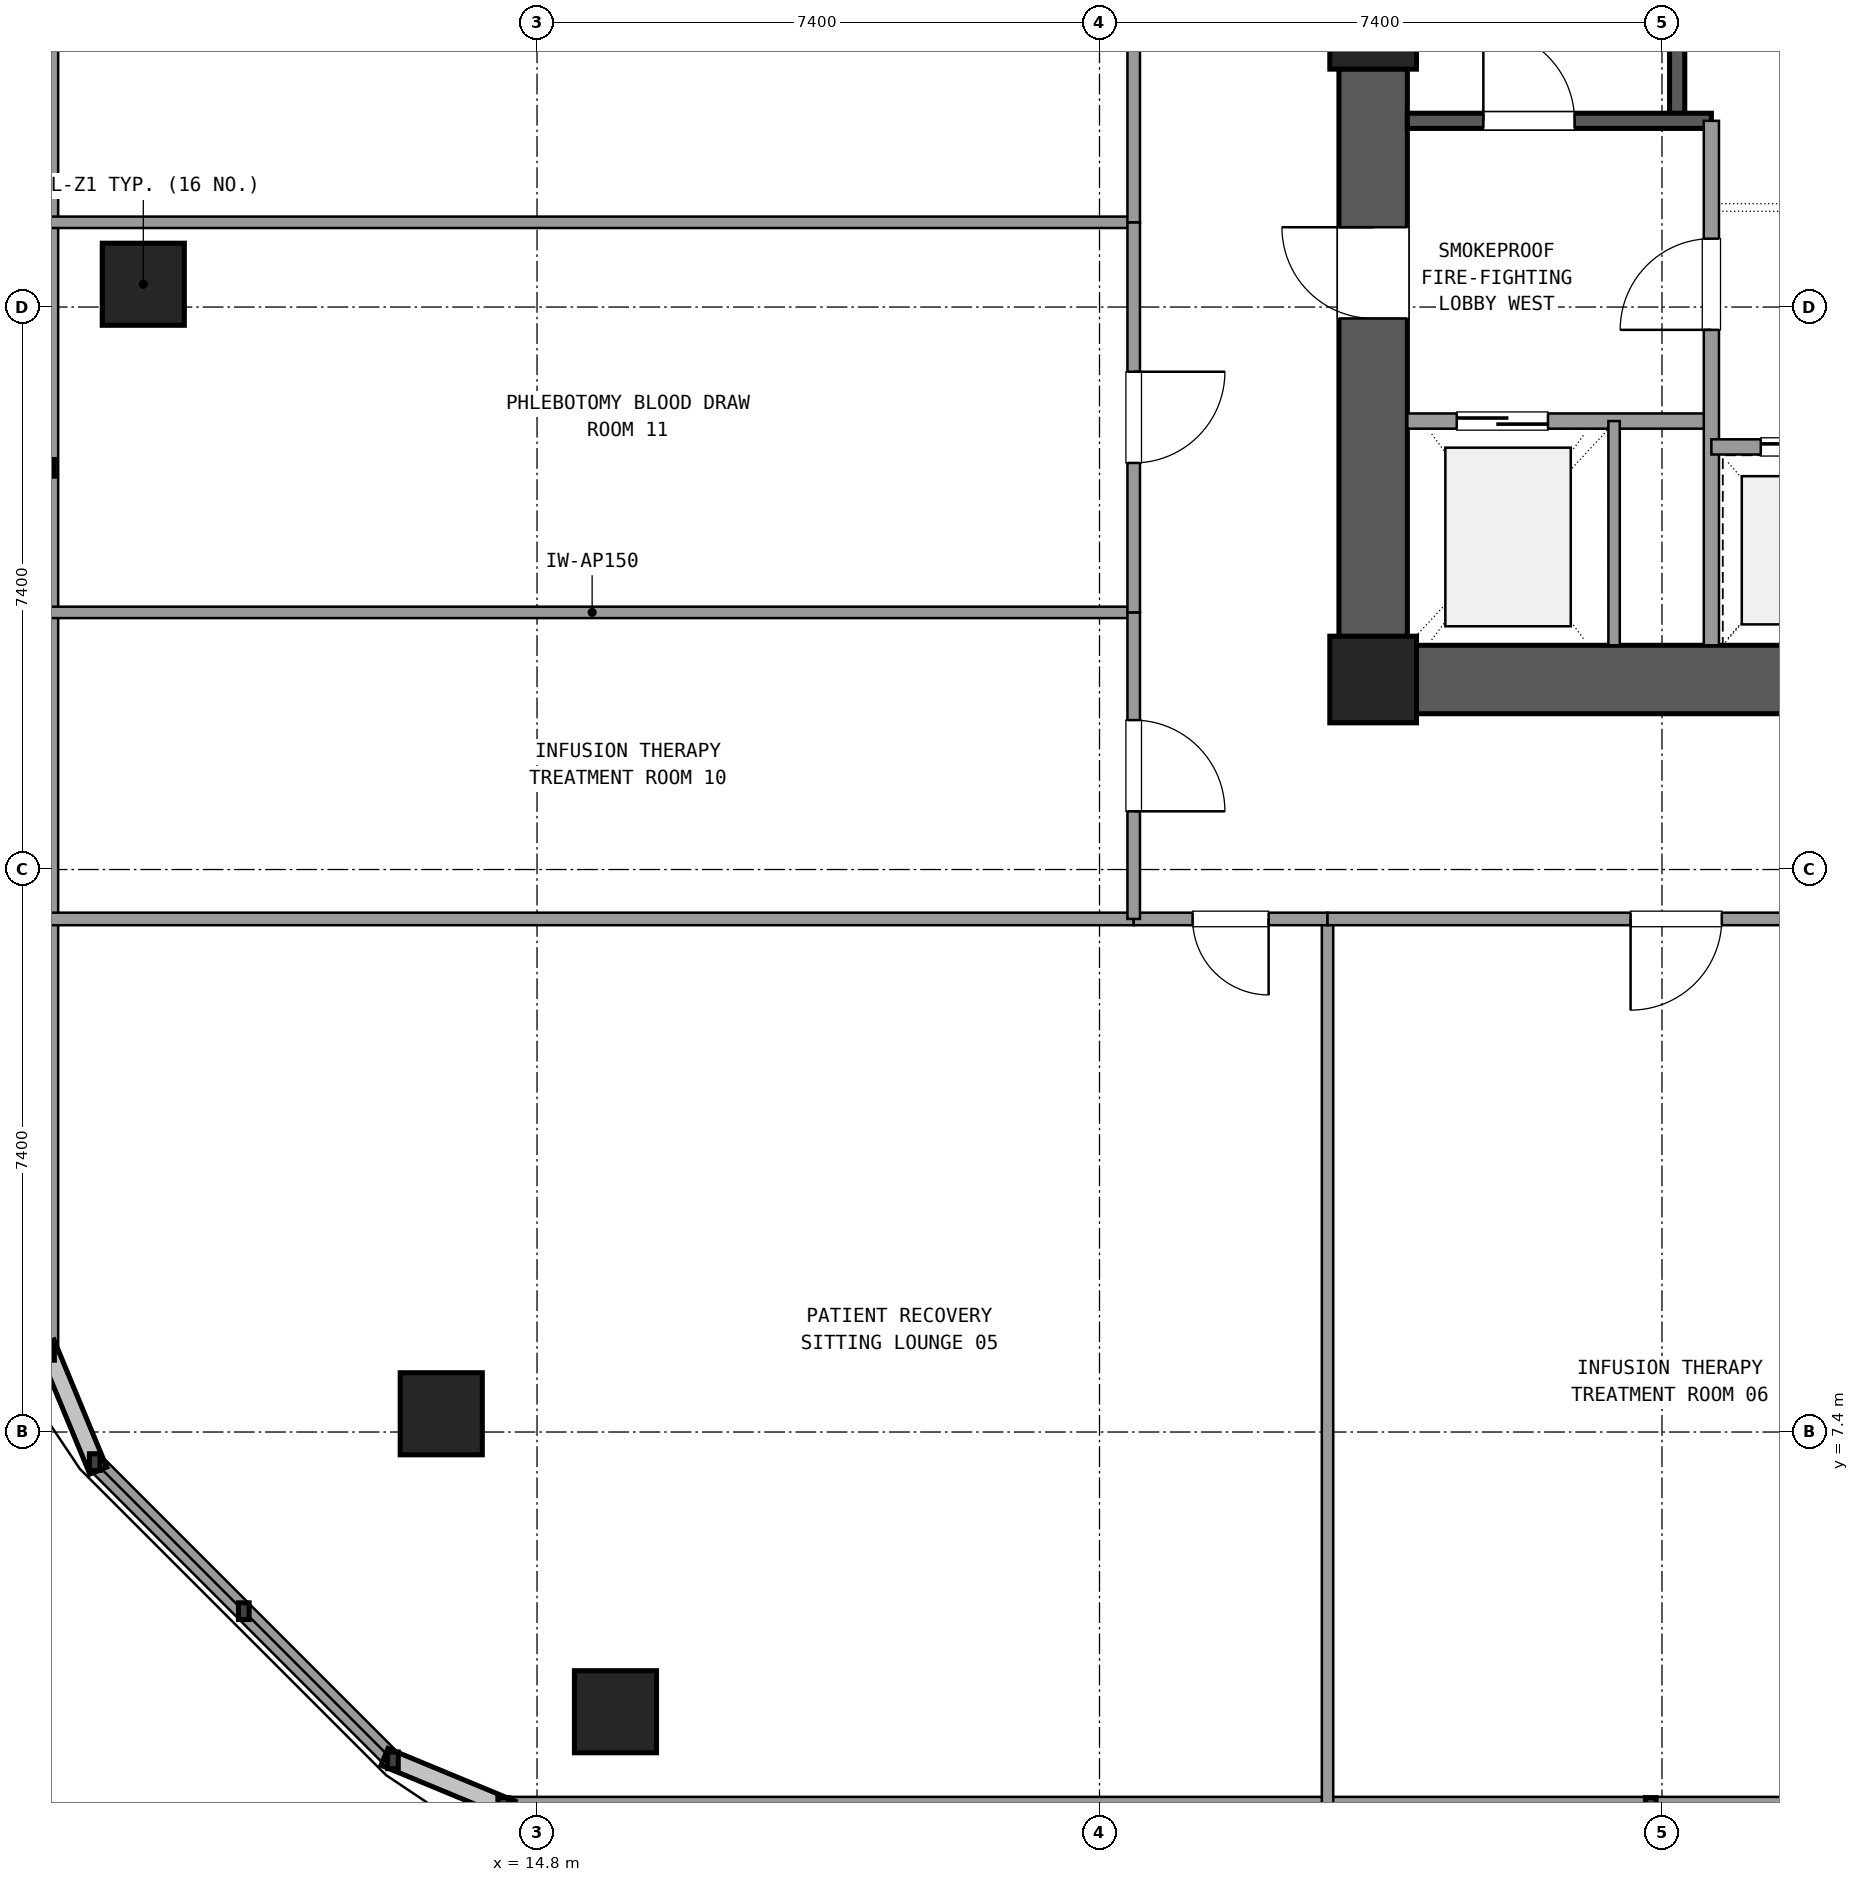
"""IFC4 building model, lengths in metres.
Left out: names, types, materials, properties, quantities, classifications, styles, units other than length and angle.
Written with IfcOpenShell. Run it as: python <this file> out.ifc"""

import sys

from ifc_helpers import new_model, si_unit, direction, frame, frame_2d, origin, origin_2d, place, context, subcontext, project, spatial, rectangle, extrude, element, fill, save


model = new_model("IFC4")
c1 = context("Model", 3, precision=1e-05, world=origin(), true_north=direction((0.0, 1.0)))
c2 = subcontext(c1, "Body", "Model", "MODEL_VIEW")
j1 = project(units=[si_unit("LENGTHUNIT", "METRE"), si_unit("PLANEANGLEUNIT", "RADIAN")], contexts=[c1])
p1 = place(None, origin())
s1 = spatial("IfcSite", under=j1, at=p1, CompositionType="ELEMENT")
p2 = place(p1, origin())
s2 = spatial("IfcBuilding", under=s1, at=p2, CompositionType="ELEMENT")
p3 = place(p2, frame((0.0, 0.0, 59.94)))
s3 = spatial("IfcBuildingStorey", under=s2, at=p3, CompositionType="ELEMENT", Elevation=59.94)
for number, where, z_axis, x_axis in (
    (1, (25.8, 17.3, 0.0), (0.0, 0.0, 1.0), (1.0, 0.0, 0.0)),
    (2, (25.8, 25.9, 0.0), (0.0, 0.0, 1.0), (1.0, 0.0, 0.0)),
):
    element("IfcColumn", number, at=place(p3, frame(where, z_axis=z_axis, x_axis=x_axis)), inside=s3, PredefinedType="COLUMN", context=c2, shape_type="SweptSolid", body=[
        extrude(rectangle(XDim=1.14, YDim=1.14, at=origin_2d()), origin(), (0.0, 0.0, 1.0), 3.6),
    ])
p4 = place(p3, frame((26.365, 17.3, 0.0), z_axis=(0.0, 0.0, 1.0), x_axis=(1.0, 0.0, 0.0)))
e3 = element("IfcWall", 3, at=p4, inside=s3, PredefinedType="SHEAR", context=c2, shape_type="SweptSolid", body=[
    extrude(rectangle(XDim=10.07, YDim=0.9, at=frame_2d((5.035, 0.0))), origin(), (0.0, 0.0, 1.0), 3.32),
])
p5 = place(p3, frame((25.8, 25.335, 0.0), z_axis=(0.0, 0.0, 1.0), x_axis=(0.0, -1.0, 0.0)))
e4 = element("IfcWall", 4, at=p5, inside=s3, PredefinedType="SHEAR", context=c2, shape_type="SweptSolid", body=[
    extrude(rectangle(XDim=7.47, YDim=0.9, at=frame_2d((3.735, 0.0))), origin(), (0.0, 0.0, 1.0), 3.32),
])
p6 = place(p5, frame((2.085, 0.0, 0.0)))
e5 = element("IfcOpeningElement", 5, at=p6, cuts=e4, PredefinedType="OPENING", context=c2, shape_type="SweptSolid", body=[
    extrude(rectangle(XDim=1.2, YDim=2.15, at=frame_2d((0.6, 1.075))), frame((0.0, 0.46, 0.0), z_axis=(0.0, -1.0, 0.0), x_axis=(1.0, 0.0, 0.0)), (0.0, 0.0, 1.0), 0.92),
])
for number, where, z_axis, x_axis in (
    (6, (9.62, 22.5, 0.0), (0.0, 0.0, 1.0), (1.0, 0.0, 0.0)),
    (7, (13.54, 7.64, 0.0), (0.0, 0.0, 1.0), (1.0, 0.0, 0.0)),
    (8, (15.832, 3.72, 0.0), (0.0, 0.0, 1.0), (1.0, 0.0, 0.0)),
):
    element("IfcColumn", number, at=place(p3, frame(where, z_axis=z_axis, x_axis=x_axis)), inside=s3, PredefinedType="COLUMN", context=c2, shape_type="SweptSolid", body=[
        extrude(rectangle(XDim=1.08, YDim=1.08, at=origin_2d()), origin(), (0.0, 0.0, 1.0), 3.6),
    ])
p7 = place(p3, frame((14.355, 2.48, 0.0), z_axis=(0.0, 0.0, 1.0), x_axis=(1.0, 0.0, 0.0)))
e9 = element("IfcWall", 9, at=p7, inside=s3, PredefinedType="SOLIDWALL", context=c2, shape_type="SweptSolid", body=[
    extrude(rectangle(XDim=45.29, YDim=0.24, at=frame_2d((22.645, 0.0))), origin(), (0.0, 0.0, 1.0), 0.85),
])
p8 = place(p3, frame((8.38, 43.345, 0.0), z_axis=(0.0, 0.0, 1.0), x_axis=(0.0, -1.0, 0.0)))
e10 = element("IfcWall", 10, at=p8, inside=s3, PredefinedType="SOLIDWALL", context=c2, shape_type="SweptSolid", body=[
    extrude(rectangle(XDim=34.89, YDim=0.24, at=frame_2d((17.445, 0.0))), origin(), (0.0, 0.0, 1.0), 0.85),
])
p9 = place(p3, frame((8.981, 7.004, 0.0), z_axis=(0.0, 0.0, 1.0), x_axis=(0.707128783731, -0.707084777957, 0.0)))
e11 = element("IfcWall", 11, at=p9, inside=s3, PredefinedType="SOLIDWALL", context=c2, shape_type="SweptSolid", body=[
    extrude(rectangle(XDim=5.548, YDim=0.24, at=frame_2d((2.774, 0.0))), origin(), (0.0, 0.0, 1.0), 0.85),
])
p10 = place(p3, frame((29.8, 24.65, 0.0), z_axis=(0.0, 0.0, 1.0), x_axis=(0.0, 1.0, 0.0)))
e12 = element("IfcWall", 12, at=p10, inside=s3, PredefinedType="SHEAR", context=c2, shape_type="SweptSolid", body=[
    extrude(rectangle(XDim=9.4, YDim=0.2, at=frame_2d((4.7, 0.0))), origin(), (0.0, 0.0, 1.0), 3.32),
])
p11 = place(p3, frame((26.25, 24.65, 0.0), z_axis=(0.0, 0.0, 1.0), x_axis=(1.0, 0.0, 0.0)))
e13 = element("IfcWall", 13, at=p11, inside=s3, PredefinedType="SHEAR", context=c2, shape_type="SweptSolid", body=[
    extrude(rectangle(XDim=4.0, YDim=0.2, at=frame_2d((2.0, 0.0))), origin(), (0.0, 0.0, 1.0), 3.32),
])
p12 = place(p11, frame((1.0, 0.0, 0.0)))
e14 = element("IfcOpeningElement", 14, at=p12, cuts=e13, PredefinedType="OPENING", context=c2, shape_type="SweptSolid", body=[
    extrude(rectangle(XDim=1.2, YDim=2.15, at=frame_2d((0.6, 1.075))), frame((0.0, 0.11, 0.0), z_axis=(0.0, -1.0, 0.0), x_axis=(1.0, 0.0, 0.0)), (0.0, 0.0, 1.0), 0.22),
])
p13 = place(p3, frame((26.25, 20.7, 0.0), z_axis=(0.0, 0.0, 1.0), x_axis=(1.0, 0.0, 0.0)))
e15 = element("IfcWall", 15, at=p13, inside=s3, PredefinedType="SOLIDWALL", context=c2, shape_type="SweptSolid", body=[
    extrude(rectangle(XDim=4.0, YDim=0.2, at=frame_2d((2.0, 0.0))), origin(), (0.0, 0.0, 1.0), 2.61),
])
p14 = place(p13, frame((0.65, 0.0, 0.0)))
e16 = element("IfcOpeningElement", 16, at=p14, cuts=e15, PredefinedType="OPENING", context=c2, shape_type="SweptSolid", body=[
    extrude(rectangle(XDim=1.2, YDim=2.15, at=frame_2d((0.6, 1.075))), frame((0.0, 0.11, 0.0), z_axis=(0.0, -1.0, 0.0), x_axis=(1.0, 0.0, 0.0)), (0.0, 0.0, 1.0), 0.22),
])
p15 = place(p3, frame((30.25, 17.75, 0.0), z_axis=(0.0, 0.0, 1.0), x_axis=(0.0, 1.0, 0.0)))
e17 = element("IfcWall", 17, at=p15, inside=s3, PredefinedType="SOLIDWALL", context=c2, shape_type="SweptSolid", body=[
    extrude(rectangle(XDim=6.9, YDim=0.2, at=frame_2d((3.45, 0.0))), origin(), (0.0, 0.0, 1.0), 2.61),
])
p16 = place(p15, frame((4.15, 0.0, 0.0)))
e18 = element("IfcOpeningElement", 18, at=p16, cuts=e17, PredefinedType="OPENING", context=c2, shape_type="SweptSolid", body=[
    extrude(rectangle(XDim=1.2, YDim=2.15, at=frame_2d((0.6, 1.075))), frame((0.0, 0.11, 0.0), z_axis=(0.0, -1.0, 0.0), x_axis=(1.0, 0.0, 0.0)), (0.0, 0.0, 1.0), 0.22),
])
p17 = place(p3, frame((28.97, 17.75, 0.0), z_axis=(0.0, 0.0, 1.0), x_axis=(0.0, 1.0, 0.0)))
e19 = element("IfcWall", 19, at=p17, inside=s3, PredefinedType="PARTITIONING", context=c2, shape_type="SweptSolid", body=[
    extrude(rectangle(XDim=2.95, YDim=0.15, at=frame_2d((1.475, 0.0))), origin(), (0.0, 0.0, 1.0), 2.61),
])
p18 = place(p3, frame((30.25, 20.36, 0.0), z_axis=(0.0, 0.0, 1.0), x_axis=(1.0, 0.0, 0.0)))
e20 = element("IfcWall", 20, at=p18, inside=s3, PredefinedType="SOLIDWALL", context=c2, shape_type="SweptSolid", body=[
    extrude(rectangle(XDim=7.0, YDim=0.2, at=frame_2d((3.5, 0.0))), origin(), (0.0, 0.0, 1.0), 2.61),
])
p19 = place(p18, frame((0.65, 0.0, 0.0)))
e21 = element("IfcOpeningElement", 21, at=p19, cuts=e20, PredefinedType="OPENING", context=c2, shape_type="SweptSolid", body=[
    extrude(rectangle(XDim=1.1, YDim=2.15, at=frame_2d((0.55, 1.075))), frame((0.0, 0.11, 0.0), z_axis=(0.0, -1.0, 0.0), x_axis=(1.0, 0.0, 0.0)), (0.0, 0.0, 1.0), 0.22),
])
p20 = place(p18, frame((2.95, 0.0, 0.0)))
e22 = element("IfcOpeningElement", 22, at=p20, cuts=e20, PredefinedType="OPENING", context=c2, shape_type="SweptSolid", body=[
    extrude(rectangle(XDim=1.1, YDim=2.15, at=frame_2d((0.55, 1.075))), frame((0.0, 0.11, 0.0), z_axis=(0.0, -1.0, 0.0), x_axis=(1.0, 0.0, 0.0)), (0.0, 0.0, 1.0), 0.22),
])
p21 = place(p18, frame((5.25, 0.0, 0.0)))
e23 = element("IfcOpeningElement", 23, at=p21, cuts=e20, PredefinedType="OPENING", context=c2, shape_type="SweptSolid", body=[
    extrude(rectangle(XDim=1.1, YDim=2.15, at=frame_2d((0.55, 1.075))), frame((0.0, 0.11, 0.0), z_axis=(0.0, -1.0, 0.0), x_axis=(1.0, 0.0, 0.0)), (0.0, 0.0, 1.0), 0.22),
])
p22 = place(p3, frame((8.4, 14.15, 0.0), z_axis=(0.0, 0.0, 1.0), x_axis=(1.0, 0.0, 0.0)))
e24 = element("IfcWall", 24, at=p22, inside=s3, PredefinedType="PARTITIONING", context=c2, shape_type="SweptSolid", body=[
    extrude(rectangle(XDim=14.25, YDim=0.165, at=frame_2d((7.125, 0.0))), origin(), (0.0, 0.0, 1.0), 2.61),
])
p23 = place(p3, frame((25.2, 14.15, 0.0), z_axis=(0.0, 0.0, 1.0), x_axis=(0.0, -1.0, 0.0)))
e25 = element("IfcWall", 25, at=p23, inside=s3, PredefinedType="PARTITIONING", context=c2, shape_type="SweptSolid", body=[
    extrude(rectangle(XDim=11.65, YDim=0.15, at=frame_2d((5.825, 0.0))), origin(), (0.0, 0.0, 1.0), 2.61),
])
p24 = place(p3, frame((22.65, 14.15, 0.0), z_axis=(0.0, 0.0, 1.0), x_axis=(1.0, 0.0, 0.0)))
e26 = element("IfcWall", 26, at=p24, inside=s3, PredefinedType="PARTITIONING", context=c2, shape_type="SweptSolid", body=[
    extrude(rectangle(XDim=2.55, YDim=0.165, at=frame_2d((1.275, 0.0))), origin(), (0.0, 0.0, 1.0), 2.61),
])
p25 = place(p24, frame((0.775, 0.0, 0.0)))
e27 = element("IfcOpeningElement", 27, at=p25, cuts=e26, PredefinedType="OPENING", context=c2, shape_type="SweptSolid", body=[
    extrude(rectangle(XDim=1.0, YDim=2.15, at=frame_2d((0.5, 1.075))), frame((0.0, 0.093, 0.0), z_axis=(0.0, -1.0, 0.0), x_axis=(1.0, 0.0, 0.0)), (0.0, 0.0, 1.0), 0.185),
])
p26 = place(p3, frame((25.2, 14.15, 0.0), z_axis=(0.0, 0.0, 1.0), x_axis=(1.0, 0.0, 0.0)))
e28 = element("IfcWall", 28, at=p26, inside=s3, PredefinedType="PARTITIONING", context=c2, shape_type="SweptSolid", body=[
    extrude(rectangle(XDim=9.174, YDim=0.165, at=frame_2d((4.587, 0.0))), origin(), (0.0, 0.0, 1.0), 2.61),
])
p27 = place(p26, frame((3.987, 0.0, 0.0)))
e29 = element("IfcOpeningElement", 29, at=p27, cuts=e28, PredefinedType="OPENING", context=c2, shape_type="SweptSolid", body=[
    extrude(rectangle(XDim=1.2, YDim=2.15, at=frame_2d((0.6, 1.075))), frame((0.0, 0.093, 0.0), z_axis=(0.0, -1.0, 0.0), x_axis=(1.0, 0.0, 0.0)), (0.0, 0.0, 1.0), 0.185),
])
p28 = place(p3, frame((22.65, 18.183, 0.0), z_axis=(0.0, 0.0, 1.0), x_axis=(-1.0, 0.0, 0.0)))
e30 = element("IfcWall", 30, at=p28, inside=s3, PredefinedType="PARTITIONING", context=c2, shape_type="SweptSolid", body=[
    extrude(rectangle(XDim=14.25, YDim=0.15, at=frame_2d((7.125, 0.0))), origin(), (0.0, 0.0, 1.0), 2.61),
])
p29 = place(p3, frame((22.65, 14.15, 0.0), z_axis=(0.0, 0.0, 1.0), x_axis=(0.0, 1.0, 0.0)))
e31 = element("IfcWall", 31, at=p29, inside=s3, PredefinedType="PARTITIONING", context=c2, shape_type="SweptSolid", body=[
    extrude(rectangle(XDim=4.033, YDim=0.165, at=frame_2d((2.017, 0.0))), origin(), (0.0, 0.0, 1.0), 2.61),
])
p30 = place(p29, frame((1.416, 0.0, 0.0)))
e32 = element("IfcOpeningElement", 32, at=p30, cuts=e31, PredefinedType="OPENING", context=c2, shape_type="SweptSolid", body=[
    extrude(rectangle(XDim=1.2, YDim=2.15, at=frame_2d((0.6, 1.075))), frame((0.0, 0.093, 0.0), z_axis=(0.0, -1.0, 0.0), x_axis=(1.0, 0.0, 0.0)), (0.0, 0.0, 1.0), 0.185),
])
p31 = place(p3, frame((22.65, 23.315, 0.0), z_axis=(0.0, 0.0, 1.0), x_axis=(-1.0, 0.0, 0.0)))
e33 = element("IfcWall", 33, at=p31, inside=s3, PredefinedType="PARTITIONING", context=c2, shape_type="SweptSolid", body=[
    extrude(rectangle(XDim=14.25, YDim=0.15, at=frame_2d((7.125, 0.0))), origin(), (0.0, 0.0, 1.0), 2.61),
])
p32 = place(p3, frame((22.65, 18.183, 0.0), z_axis=(0.0, 0.0, 1.0), x_axis=(0.0, 1.0, 0.0)))
e34 = element("IfcWall", 34, at=p32, inside=s3, PredefinedType="PARTITIONING", context=c2, shape_type="SweptSolid", body=[
    extrude(rectangle(XDim=5.132, YDim=0.165, at=frame_2d((2.566, 0.0))), origin(), (0.0, 0.0, 1.0), 2.61),
])
p33 = place(p32, frame((1.966, 0.0, 0.0)))
e35 = element("IfcOpeningElement", 35, at=p33, cuts=e34, PredefinedType="OPENING", context=c2, shape_type="SweptSolid", body=[
    extrude(rectangle(XDim=1.2, YDim=2.15, at=frame_2d((0.6, 1.075))), frame((0.0, 0.093, 0.0), z_axis=(0.0, -1.0, 0.0), x_axis=(1.0, 0.0, 0.0)), (0.0, 0.0, 1.0), 0.185),
])
p34 = place(p3, frame((22.65, 23.315, 0.0), z_axis=(0.0, 0.0, 1.0), x_axis=(0.0, 1.0, 0.0)))
e36 = element("IfcWall", 36, at=p34, inside=s3, PredefinedType="PARTITIONING", context=c2, shape_type="SweptSolid", body=[
    extrude(rectangle(XDim=7.99, YDim=0.165, at=frame_2d((3.995, 0.0))), origin(), (0.0, 0.0, 1.0), 2.61),
])
p35 = place(p34, frame((3.395, 0.0, 0.0)))
e37 = element("IfcOpeningElement", 37, at=p35, cuts=e36, PredefinedType="OPENING", context=c2, shape_type="SweptSolid", body=[
    extrude(rectangle(XDim=1.2, YDim=2.15, at=frame_2d((0.6, 1.075))), frame((0.0, 0.093, 0.0), z_axis=(0.0, -1.0, 0.0), x_axis=(1.0, 0.0, 0.0)), (0.0, 0.0, 1.0), 0.185),
])
p36 = place(p12, origin())
e38 = element("IfcDoor", 38, at=p36, inside=s3, OperationType="SINGLE_SWING_LEFT", PredefinedType="DOOR", context=c2, shape_type="SweptSolid", body=[
    extrude(rectangle(XDim=1.2, YDim=2.15, at=frame_2d((0.6, 1.075))), frame((0.0, 0.025, 0.0), z_axis=(0.0, -1.0, 0.0), x_axis=(1.0, 0.0, 0.0)), (0.0, 0.0, 1.0), 0.05),
])
fill(e14, e38)
p37 = place(p14, origin())
e39 = element("IfcDoor", 39, at=p37, inside=s3, OperationType="SLIDING_TO_LEFT", PredefinedType="DOOR", context=c2, shape_type="SweptSolid", body=[
    extrude(rectangle(XDim=1.2, YDim=2.15, at=frame_2d((0.6, 1.075))), frame((0.0, 0.025, 0.0), z_axis=(0.0, -1.0, 0.0), x_axis=(1.0, 0.0, 0.0)), (0.0, 0.0, 1.0), 0.05),
])
fill(e16, e39)
p38 = place(p16, origin())
e40 = element("IfcDoor", 40, at=p38, inside=s3, OperationType="SINGLE_SWING_LEFT", PredefinedType="DOOR", context=c2, shape_type="SweptSolid", body=[
    extrude(rectangle(XDim=1.2, YDim=2.15, at=frame_2d((0.6, 1.075))), frame((0.0, 0.025, 0.0), z_axis=(0.0, -1.0, 0.0), x_axis=(1.0, 0.0, 0.0)), (0.0, 0.0, 1.0), 0.05),
])
fill(e18, e40)
p39 = place(p6, frame((1.2, 0.0, 0.0), z_axis=(0.0, 0.0, 1.0), x_axis=(-1.0, 0.0, 0.0)))
e41 = element("IfcDoor", 41, at=p39, inside=s3, OperationType="SINGLE_SWING_LEFT", PredefinedType="DOOR", context=c2, shape_type="SweptSolid", body=[
    extrude(rectangle(XDim=1.2, YDim=2.15, at=frame_2d((0.6, 1.075))), frame((0.0, 0.025, 0.0), z_axis=(0.0, -1.0, 0.0), x_axis=(1.0, 0.0, 0.0)), (0.0, 0.0, 1.0), 0.05),
])
fill(e5, e41)
p40 = place(p19, origin())
e42 = element("IfcDoor", 42, at=p40, inside=s3, OperationType="SLIDING_TO_LEFT", PredefinedType="DOOR", context=c2, shape_type="SweptSolid", body=[
    extrude(rectangle(XDim=1.1, YDim=2.15, at=frame_2d((0.55, 1.075))), frame((0.0, 0.025, 0.0), z_axis=(0.0, -1.0, 0.0), x_axis=(1.0, 0.0, 0.0)), (0.0, 0.0, 1.0), 0.05),
])
fill(e21, e42)
p41 = place(p25, frame((1.0, 0.0, 0.0), z_axis=(0.0, 0.0, 1.0), x_axis=(-1.0, 0.0, 0.0)))
e43 = element("IfcDoor", 43, at=p41, inside=s3, OperationType="SINGLE_SWING_RIGHT", PredefinedType="DOOR", context=c2, shape_type="SweptSolid", body=[
    extrude(rectangle(XDim=1.0, YDim=2.15, at=frame_2d((0.5, 1.075))), frame((0.0, 0.025, 0.0), z_axis=(0.0, -1.0, 0.0), x_axis=(1.0, 0.0, 0.0)), (0.0, 0.0, 1.0), 0.05),
])
fill(e27, e43)
p42 = place(p27, frame((1.2, 0.0, 0.0), z_axis=(0.0, 0.0, 1.0), x_axis=(-1.0, 0.0, 0.0)))
e44 = element("IfcDoor", 44, at=p42, inside=s3, OperationType="SINGLE_SWING_LEFT", PredefinedType="DOOR", context=c2, shape_type="SweptSolid", body=[
    extrude(rectangle(XDim=1.2, YDim=2.15, at=frame_2d((0.6, 1.075))), frame((0.0, 0.025, 0.0), z_axis=(0.0, -1.0, 0.0), x_axis=(1.0, 0.0, 0.0)), (0.0, 0.0, 1.0), 0.05),
])
fill(e29, e44)
p43 = place(p30, frame((1.2, 0.0, 0.0), z_axis=(0.0, 0.0, 1.0), x_axis=(-1.0, 0.0, 0.0)))
e45 = element("IfcDoor", 45, at=p43, inside=s3, OperationType="SINGLE_SWING_LEFT", PredefinedType="DOOR", context=c2, shape_type="SweptSolid", body=[
    extrude(rectangle(XDim=1.2, YDim=2.15, at=frame_2d((0.6, 1.075))), frame((0.0, 0.025, 0.0), z_axis=(0.0, -1.0, 0.0), x_axis=(1.0, 0.0, 0.0)), (0.0, 0.0, 1.0), 0.05),
])
fill(e32, e45)
p44 = place(p33, frame((1.2, 0.0, 0.0), z_axis=(0.0, 0.0, 1.0), x_axis=(-1.0, 0.0, 0.0)))
e46 = element("IfcDoor", 46, at=p44, inside=s3, OperationType="SINGLE_SWING_RIGHT", PredefinedType="DOOR", context=c2, shape_type="SweptSolid", body=[
    extrude(rectangle(XDim=1.2, YDim=2.15, at=frame_2d((0.6, 1.075))), frame((0.0, 0.025, 0.0), z_axis=(0.0, -1.0, 0.0), x_axis=(1.0, 0.0, 0.0)), (0.0, 0.0, 1.0), 0.05),
])
fill(e35, e46)
save(model, sys.argv[1])
